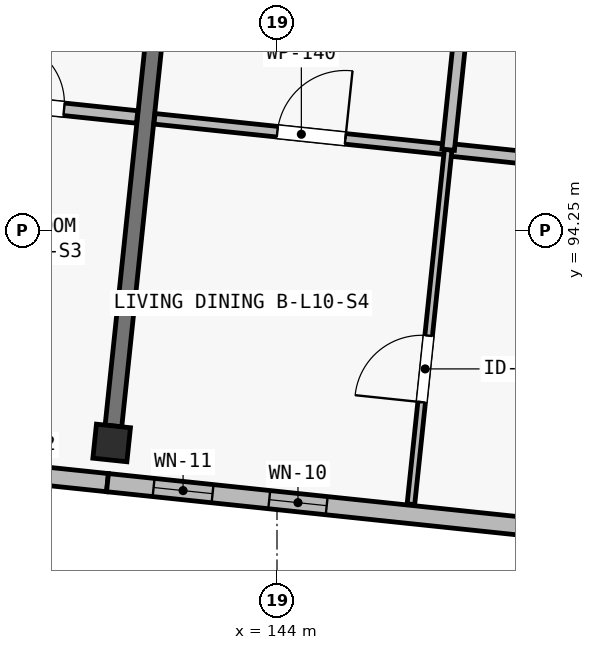
"""IFC4 building model, lengths in metres.
Left out: names, types, materials, properties, quantities, classifications, styles, units other than length and angle.
Written with IfcOpenShell. Run it as: python <this file> out.ifc"""

import sys

from ifc_helpers import new_model, si_unit, direction, frame, frame_2d, origin, origin_2d, place, context, subcontext, project, spatial, rectangle, extrude, element, fill, save


model = new_model("IFC4")
c1 = context("Model", 3, precision=1e-05, world=origin(), true_north=direction((0.0, 1.0)))
c2 = subcontext(c1, "Body", "Model", "MODEL_VIEW")
j1 = project(units=[si_unit("LENGTHUNIT", "METRE"), si_unit("PLANEANGLEUNIT", "RADIAN")], contexts=[c1])
p1 = place(None, origin())
s1 = spatial("IfcSite", under=j1, at=p1, CompositionType="ELEMENT")
p2 = place(p1, origin())
s2 = spatial("IfcBuilding", under=s1, at=p2, CompositionType="ELEMENT")
p3 = place(p2, frame((0.0, 0.0, 34.4)))
s3 = spatial("IfcBuildingStorey", under=s2, at=p3, CompositionType="ELEMENT", Elevation=34.4)
p4 = place(p3, frame((141.825, 91.455, 0.0), z_axis=(0.0, 0.0, 1.0), x_axis=(0.994521895368, -0.104528463268, 0.0)))
e1 = element("IfcColumn", 1, at=p4, inside=s3, PredefinedType="COLUMN", context=c2, shape_type="SweptSolid", body=[
    extrude(rectangle(XDim=0.45, YDim=0.45, at=origin_2d()), origin(), (0.0, 0.0, 1.0), 3.25),
])
p5 = place(p3, frame((141.848, 91.679, 0.0), z_axis=(0.0, 0.0, 1.0), x_axis=(0.104553253602, 0.994519289487, 0.0)))
e2 = element("IfcWall", 2, at=p5, inside=s3, PredefinedType="SHEAR", context=c2, shape_type="SweptSolid", body=[
    extrude(rectangle(XDim=7.15, YDim=0.22, at=frame_2d((3.575, 0.0))), origin(), (0.0, 0.0, 1.0), 2.5),
])
p6 = place(p3, frame((141.77, 90.933, 0.0), z_axis=(0.0, 0.0, 1.0), x_axis=(-0.994519156568, 0.104554517933, 0.0)))
e3 = element("IfcWall", 3, at=p6, inside=s3, PredefinedType="SOLIDWALL", context=c2, shape_type="SweptSolid", body=[
    extrude(rectangle(XDim=8.0, YDim=0.24, at=frame_2d((4.0, 0.0))), origin(), (0.0, 0.0, 1.0), 3.0),
])
p7 = place(p6, frame((0.76, 0.0, 0.48)))
e4 = element("IfcOpeningElement", 4, at=p7, cuts=e3, PredefinedType="OPENING", context=c2, shape_type="SweptSolid", body=[
    extrude(rectangle(XDim=0.6, YDim=2.22, at=frame_2d((0.3, 1.11))), frame((0.0, 0.135, 0.0), z_axis=(0.0, -1.0, 0.0), x_axis=(1.0, 0.0, 0.0)), (0.0, 0.0, 1.0), 0.27),
])
p8 = place(p6, frame((3.585, 0.0, 0.48)))
e5 = element("IfcOpeningElement", 5, at=p8, cuts=e3, PredefinedType="OPENING", context=c2, shape_type="SweptSolid", body=[
    extrude(rectangle(XDim=0.66, YDim=2.32, at=frame_2d((0.33, 1.16))), frame((0.0, 0.135, 0.0), z_axis=(0.0, -1.0, 0.0), x_axis=(1.0, 0.0, 0.0)), (0.0, 0.0, 1.0), 0.27),
])
p9 = place(p3, frame((149.726, 90.097, 0.0), z_axis=(0.0, 0.0, 1.0), x_axis=(-0.994522662826, 0.104521161134, 0.0)))
e6 = element("IfcWall", 6, at=p9, inside=s3, PredefinedType="SOLIDWALL", context=c2, shape_type="SweptSolid", body=[
    extrude(rectangle(XDim=8.0, YDim=0.24, at=frame_2d((4.0, 0.0))), origin(), (0.0, 0.0, 1.0), 3.0),
])
p10 = place(p9, frame((1.713, 0.0, 0.5)))
e7 = element("IfcOpeningElement", 7, at=p10, cuts=e6, PredefinedType="OPENING", context=c2, shape_type="SweptSolid", body=[
    extrude(rectangle(XDim=0.7, YDim=2.36, at=frame_2d((0.35, 1.18))), frame((0.0, 0.135, 0.0), z_axis=(0.0, -1.0, 0.0), x_axis=(1.0, 0.0, 0.0)), (0.0, 0.0, 1.0), 0.27),
])
p11 = place(p9, frame((5.1, 0.0, 0.52)))
e8 = element("IfcOpeningElement", 8, at=p11, cuts=e6, PredefinedType="OPENING", context=c2, shape_type="SweptSolid", body=[
    extrude(rectangle(XDim=0.76, YDim=2.34, at=frame_2d((0.38, 1.17))), frame((0.0, 0.135, 0.0), z_axis=(0.0, -1.0, 0.0), x_axis=(1.0, 0.0, 0.0)), (0.0, 0.0, 1.0), 0.27),
])
p12 = place(p9, frame((6.61, 0.0, 0.42)))
e9 = element("IfcOpeningElement", 9, at=p12, cuts=e6, PredefinedType="OPENING", context=c2, shape_type="SweptSolid", body=[
    extrude(rectangle(XDim=0.78, YDim=2.2, at=frame_2d((0.39, 1.1))), frame((0.0, 0.135, 0.0), z_axis=(0.0, -1.0, 0.0), x_axis=(1.0, 0.0, 0.0)), (0.0, 0.0, 1.0), 0.27),
])
p13 = place(p3, frame((139.683, 96.004, 0.0), z_axis=(0.0, 0.0, 1.0), x_axis=(0.994523702879, -0.104511264518, 0.0)))
e10 = element("IfcWall", 10, at=p13, inside=s3, PredefinedType="PLUMBINGWALL", context=c2, shape_type="SweptSolid", body=[
    extrude(rectangle(XDim=2.49, YDim=0.165, at=frame_2d((1.245, 0.0))), origin(), (0.0, 0.0, 1.0), 2.97),
])
p14 = place(p13, frame((0.703, 0.0, 0.0)))
e11 = element("IfcOpeningElement", 11, at=p14, cuts=e10, PredefinedType="OPENING", context=c2, shape_type="SweptSolid", body=[
    extrude(rectangle(XDim=0.82, YDim=2.08, at=frame_2d((0.41, 1.04))), frame((0.0, 0.097, 0.0), z_axis=(0.0, -1.0, 0.0), x_axis=(1.0, 0.0, 0.0)), (0.0, 0.0, 1.0), 0.195),
])
p15 = place(p3, frame((142.388, 95.719, 0.0), z_axis=(0.0, 0.0, 1.0), x_axis=(0.994524375082, -0.104504867671, 0.0)))
e12 = element("IfcWall", 12, at=p15, inside=s3, PredefinedType="PARTITIONING", context=c2, shape_type="SweptSolid", body=[
    extrude(rectangle(XDim=3.885, YDim=0.14, at=frame_2d((1.942, 0.0))), origin(), (0.0, 0.0, 1.0), 2.97),
])
p16 = place(p15, frame((1.625, 0.0, 0.0)))
e13 = element("IfcOpeningElement", 13, at=p16, cuts=e12, PredefinedType="OPENING", context=c2, shape_type="SweptSolid", body=[
    extrude(rectangle(XDim=0.9, YDim=2.1, at=frame_2d((0.45, 1.05))), frame((0.0, 0.085, 0.0), z_axis=(0.0, -1.0, 0.0), x_axis=(1.0, 0.0, 0.0)), (0.0, 0.0, 1.0), 0.17),
])
p17 = place(p3, frame((146.252, 95.313, 0.0), z_axis=(0.0, 0.0, 1.0), x_axis=(0.994517841934, -0.104567021925, 0.0)))
e14 = element("IfcWall", 14, at=p17, inside=s3, PredefinedType="PLUMBINGWALL", context=c2, shape_type="SweptSolid", body=[
    extrude(rectangle(XDim=3.885, YDim=0.165, at=frame_2d((1.942, 0.0))), origin(), (0.0, 0.0, 1.0), 2.97),
])
p18 = place(p17, frame((1.4, 0.0, 0.0)))
e15 = element("IfcOpeningElement", 15, at=p18, cuts=e14, PredefinedType="OPENING", context=c2, shape_type="SweptSolid", body=[
    extrude(rectangle(XDim=0.82, YDim=2.08, at=frame_2d((0.41, 1.04))), frame((0.0, 0.097, 0.0), z_axis=(0.0, -1.0, 0.0), x_axis=(1.0, 0.0, 0.0)), (0.0, 0.0, 1.0), 0.195),
])
p19 = place(p3, frame((145.762, 90.649, 0.0), z_axis=(0.0, 0.0, 1.0), x_axis=(0.104527618124, 0.994521984196, 0.0)))
e16 = element("IfcWall", 16, at=p19, inside=s3, PredefinedType="PARTITIONING", context=c2, shape_type="SweptSolid", body=[
    extrude(rectangle(XDim=4.69, YDim=0.1, at=frame_2d((2.345, 0.0))), origin(), (0.0, 0.0, 1.0), 2.97),
])
p20 = place(p19, frame((1.35, 0.0, 0.0)))
e17 = element("IfcOpeningElement", 17, at=p20, cuts=e16, PredefinedType="OPENING", context=c2, shape_type="SweptSolid", body=[
    extrude(rectangle(XDim=0.88, YDim=2.1, at=frame_2d((0.44, 1.05))), frame((0.0, 0.065, 0.0), z_axis=(0.0, -1.0, 0.0), x_axis=(1.0, 0.0, 0.0)), (0.0, 0.0, 1.0), 0.13),
])
p21 = place(p3, frame((146.252, 95.313, 0.0), z_axis=(0.0, 0.0, 1.0), x_axis=(0.104551541926, 0.994519469433, 0.0)))
e18 = element("IfcWall", 18, at=p21, inside=s3, PredefinedType="PLUMBINGWALL", context=c2, shape_type="SweptSolid", body=[
    extrude(rectangle(XDim=3.72, YDim=0.165, at=frame_2d((1.86, 0.0))), origin(), (0.0, 0.0, 1.0), 2.97),
])
p22 = place(p11, origin())
e19 = element("IfcWindow", 19, at=p22, inside=s3, PartitioningType="SINGLE_PANEL", PredefinedType="WINDOW", context=c2, shape_type="SweptSolid", body=[
    extrude(rectangle(XDim=0.76, YDim=2.34, at=frame_2d((0.38, 1.17))), frame((0.0, 0.03, 0.0), z_axis=(0.0, -1.0, 0.0), x_axis=(1.0, 0.0, 0.0)), (0.0, 0.0, 1.0), 0.06),
])
fill(e8, e19)
p23 = place(p12, origin())
e20 = element("IfcWindow", 20, at=p23, inside=s3, PartitioningType="SINGLE_PANEL", PredefinedType="WINDOW", context=c2, shape_type="SweptSolid", body=[
    extrude(rectangle(XDim=0.78, YDim=2.2, at=frame_2d((0.39, 1.1))), frame((0.0, 0.03, 0.0), z_axis=(0.0, -1.0, 0.0), x_axis=(1.0, 0.0, 0.0)), (0.0, 0.0, 1.0), 0.06),
])
fill(e9, e20)
p24 = place(p14, origin())
e21 = element("IfcDoor", 21, at=p24, inside=s3, OperationType="SINGLE_SWING_LEFT", PredefinedType="DOOR", context=c2, shape_type="SweptSolid", body=[
    extrude(rectangle(XDim=0.82, YDim=2.08, at=frame_2d((0.41, 1.04))), frame((0.0, 0.025, 0.0), z_axis=(0.0, -1.0, 0.0), x_axis=(1.0, 0.0, 0.0)), (0.0, 0.0, 1.0), 0.05),
])
fill(e11, e21)
p25 = place(p16, origin())
e22 = element("IfcDoor", 22, at=p25, inside=s3, OperationType="SINGLE_SWING_RIGHT", PredefinedType="DOOR", context=c2, shape_type="SweptSolid", body=[
    extrude(rectangle(XDim=0.9, YDim=2.1, at=frame_2d((0.45, 1.05))), frame((0.0, 0.025, 0.0), z_axis=(0.0, -1.0, 0.0), x_axis=(1.0, 0.0, 0.0)), (0.0, 0.0, 1.0), 0.05),
])
fill(e13, e22)
p26 = place(p20, origin())
e23 = element("IfcDoor", 23, at=p26, inside=s3, OperationType="SINGLE_SWING_LEFT", PredefinedType="DOOR", context=c2, shape_type="SweptSolid", body=[
    extrude(rectangle(XDim=0.88, YDim=2.1, at=frame_2d((0.44, 1.05))), frame((0.0, 0.025, 0.0), z_axis=(0.0, -1.0, 0.0), x_axis=(1.0, 0.0, 0.0)), (0.0, 0.0, 1.0), 0.05),
])
fill(e17, e23)
save(model, sys.argv[1])
